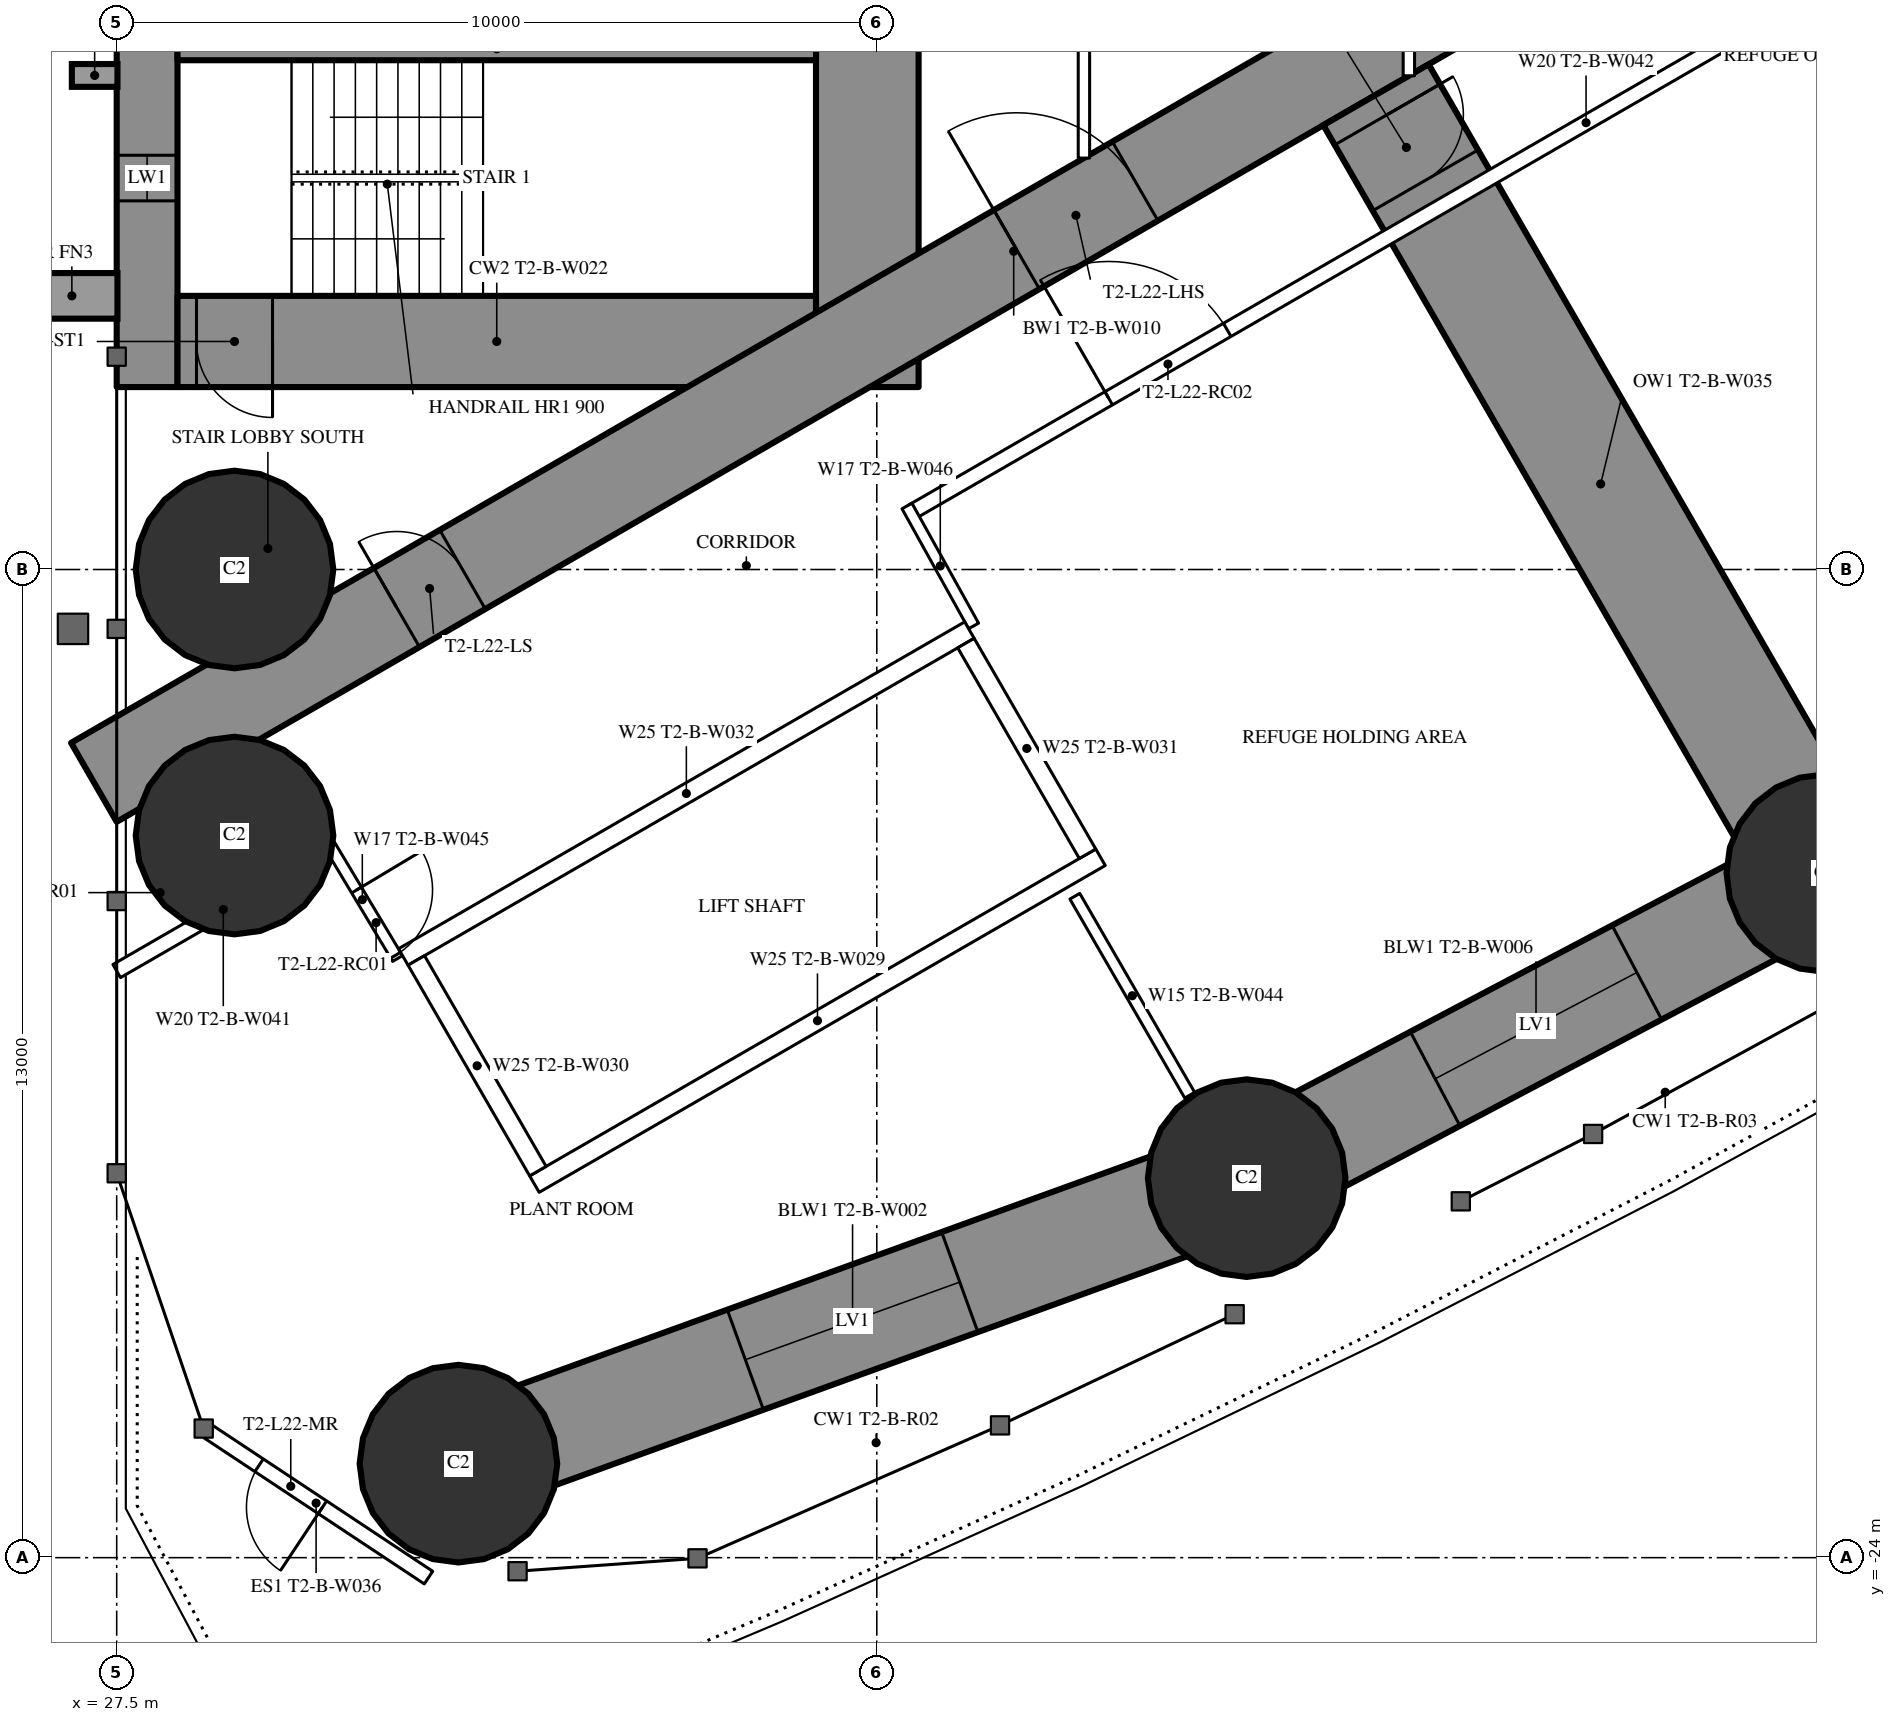
"""IFC4 building model, lengths in metres.
Left out: names, types, materials, properties, quantities, classifications, styles, units other than length and angle.
Written with IfcOpenShell. Run it as: python <this file> out.ifc"""

import sys

from ifc_helpers import new_model, si_unit, direction, frame, frame_2d, origin, origin_2d, place, context, subcontext, project, spatial, rectangle, hollow_circle, extrude, element, fill, save


model = new_model("IFC4")
c1 = context("Model", 3, precision=1e-05, world=origin(), true_north=direction((0.0, 1.0)))
c2 = subcontext(c1, "Body", "Model", "MODEL_VIEW")
j1 = project(units=[si_unit("LENGTHUNIT", "METRE"), si_unit("PLANEANGLEUNIT", "RADIAN")], contexts=[c1])
p1 = place(None, origin())
s1 = spatial("IfcSite", under=j1, at=p1, CompositionType="ELEMENT")
p2 = place(p1, origin())
s2 = spatial("IfcBuilding", under=s1, at=p2, CompositionType="ELEMENT")
p3 = place(p2, frame((0.0, 0.0, 87.0)))
s3 = spatial("IfcBuildingStorey", under=s2, at=p3, CompositionType="ELEMENT", Elevation=87.0)
for number, where, z_axis, x_axis in (
    (1, (31.996, -22.763, 0.0), (0.0, 0.0, 1.0), (1.0, 0.0, 0.0)),
    (2, (29.05, -11.0, 0.0), (0.0, 0.0, 1.0), (1.0, 0.0, 0.0)),
    (3, (29.05, -14.5, 0.0), (0.0, 0.0, 1.0), (1.0, 0.0, 0.0)),
    (4, (42.366, -19.007, 0.0), (0.0, 0.0, 1.0), (1.0, 0.0, 0.0)),
    (5, (49.979, -14.994, 0.0), (0.0, 0.0, 1.0), (1.0, 0.0, 0.0)),
):
    element("IfcColumn", number, at=place(p3, frame(where, z_axis=z_axis, x_axis=x_axis)), inside=s3, PredefinedType="COLUMN", context=c2, shape_type="SweptSolid", body=[
        extrude(hollow_circle(Radius=1.3, WallThickness=0.1, at=origin_2d()), origin(), (0.0, 0.0, 1.0), 3.6),
    ])
p4 = place(p3, frame((27.9, -8.6, 0.0), z_axis=(0.0, 0.0, 1.0), x_axis=(0.0, 1.0, 0.0)))
e6 = element("IfcWall", 6, at=p4, inside=s3, PredefinedType="SHEAR", context=c2, shape_type="SweptSolid", body=[
    extrude(rectangle(XDim=17.2, YDim=0.8, at=frame_2d((8.6, 0.0))), origin(), (0.0, 0.0, 1.0), 3.6),
])
p5 = place(p4, frame((2.45, 0.0, 0.6)))
e7 = element("IfcOpeningElement", 7, at=p5, cuts=e6, PredefinedType="OPENING", context=c2, shape_type="SweptSolid", body=[
    extrude(rectangle(XDim=0.6, YDim=2.1, at=frame_2d((0.3, 1.05))), frame((0.0, 0.41, 0.0), z_axis=(0.0, -1.0, 0.0), x_axis=(1.0, 0.0, 0.0)), (0.0, 0.0, 1.0), 0.82),
])
p6 = place(p4, frame((14.15, 0.0, 0.6)))
e8 = element("IfcOpeningElement", 8, at=p6, cuts=e6, PredefinedType="OPENING", context=c2, shape_type="SweptSolid", body=[
    extrude(rectangle(XDim=0.6, YDim=2.1, at=frame_2d((0.3, 1.05))), frame((0.0, 0.41, 0.0), z_axis=(0.0, -1.0, 0.0), x_axis=(1.0, 0.0, 0.0)), (0.0, 0.0, 1.0), 0.82),
])
p7 = place(p3, frame((37.375, -8.6, 0.0), z_axis=(0.0, 0.0, 1.0), x_axis=(0.0, 1.0, 0.0)))
e9 = element("IfcWall", 9, at=p7, inside=s3, PredefinedType="SHEAR", context=c2, shape_type="SweptSolid", body=[
    extrude(rectangle(XDim=17.2, YDim=1.35, at=frame_2d((8.6, 0.0))), origin(), (0.0, 0.0, 1.0), 3.6),
])
p8 = place(p7, frame((7.7, 0.0, 0.0)))
e10 = element("IfcOpeningElement", 10, at=p8, cuts=e9, PredefinedType="OPENING", context=c2, shape_type="SweptSolid", body=[
    extrude(rectangle(XDim=1.8, YDim=2.2, at=frame_2d((0.9, 1.1))), frame((0.0, 0.685, 0.0), z_axis=(0.0, -1.0, 0.0), x_axis=(1.0, 0.0, 0.0)), (0.0, 0.0, 1.0), 1.37),
])
p9 = place(p3, frame((28.3, -8.0, 0.0), z_axis=(0.0, 0.0, 1.0), x_axis=(1.0, 0.0, 0.0)))
e11 = element("IfcWall", 11, at=p9, inside=s3, PredefinedType="SHEAR", context=c2, shape_type="SweptSolid", body=[
    extrude(rectangle(XDim=8.4, YDim=1.2, at=frame_2d((4.2, 0.0))), origin(), (0.0, 0.0, 1.0), 3.6),
])
p10 = place(p9, frame((0.25, 0.0, 0.0)))
e12 = element("IfcOpeningElement", 12, at=p10, cuts=e11, PredefinedType="OPENING", context=c2, shape_type="SweptSolid", body=[
    extrude(rectangle(XDim=1.0, YDim=2.2, at=frame_2d((0.5, 1.1))), frame((0.0, 0.61, 0.0), z_axis=(0.0, -1.0, 0.0), x_axis=(1.0, 0.0, 0.0)), (0.0, 0.0, 1.0), 1.22),
])
p11 = place(p3, frame((28.3, -4.15, 0.0), z_axis=(0.0, 0.0, 1.0), x_axis=(1.0, 0.0, 0.0)))
e13 = element("IfcWall", 13, at=p11, inside=s3, PredefinedType="SHEAR", context=c2, shape_type="SweptSolid", body=[
    extrude(rectangle(XDim=8.4, YDim=0.3, at=frame_2d((4.2, 0.0))), origin(), (0.0, 0.0, 1.0), 3.6),
])
p12 = place(p3, frame((27.2, -13.8, 0.0), z_axis=(0.0, 0.0, 1.0), x_axis=(0.866027159892, 0.499996958321, 0.0)))
e14 = element("IfcWall", 14, at=p12, inside=s3, PredefinedType="SHEAR", context=c2, shape_type="SweptSolid", body=[
    extrude(rectangle(XDim=27.947, YDim=1.2, at=frame_2d((13.973, 0.0))), origin(), (0.0, 0.0, 1.0), 3.6),
])
p13 = place(p12, frame((4.6, 0.0, 0.0)))
e15 = element("IfcOpeningElement", 15, at=p13, cuts=e14, PredefinedType="OPENING", context=c2, shape_type="SweptSolid", body=[
    extrude(rectangle(XDim=1.0, YDim=2.2, at=frame_2d((0.5, 1.1))), frame((0.0, 0.61, 0.0), z_axis=(0.0, -1.0, 0.0), x_axis=(1.0, 0.0, 0.0)), (0.0, 0.0, 1.0), 1.22),
])
p14 = place(p12, frame((14.018, 0.0, 0.0)))
e16 = element("IfcOpeningElement", 16, at=p14, cuts=e14, PredefinedType="OPENING", context=c2, shape_type="SweptSolid", body=[
    extrude(rectangle(XDim=1.8, YDim=2.2, at=frame_2d((0.9, 1.1))), frame((0.0, 0.61, 0.0), z_axis=(0.0, -1.0, 0.0), x_axis=(1.0, 0.0, 0.0)), (0.0, 0.0, 1.0), 1.22),
])
p15 = place(p3, frame((44.067, -4.754, 0.0), z_axis=(0.0, 0.0, 1.0), x_axis=(0.499987574995, -0.866032577246, 0.0)))
e17 = element("IfcWall", 17, at=p15, inside=s3, PredefinedType="SHEAR", context=c2, shape_type="SweptSolid", body=[
    extrude(rectangle(XDim=11.824, YDim=1.6, at=frame_2d((5.912, 0.0))), origin(), (0.0, 0.0, 1.0), 3.6),
])
p16 = place(p15, frame((0.3, 0.0, 0.0)))
e18 = element("IfcOpeningElement", 18, at=p16, cuts=e17, PredefinedType="OPENING", context=c2, shape_type="SweptSolid", body=[
    extrude(rectangle(XDim=1.0, YDim=2.2, at=frame_2d((0.5, 1.1))), frame((0.0, 0.81, 0.0), z_axis=(0.0, -1.0, 0.0), x_axis=(1.0, 0.0, 0.0)), (0.0, 0.0, 1.0), 1.62),
])
p17 = place(p3, frame((31.996, -22.763, 0.0), z_axis=(0.0, 0.0, 1.0), x_axis=(0.940225039526, 0.340553777029, 0.0)))
e19 = element("IfcWall", 19, at=p17, inside=s3, PredefinedType="SHEAR", context=c2, shape_type="SweptSolid", body=[
    extrude(rectangle(XDim=11.029, YDim=1.4, at=frame_2d((5.515, 0.0))), origin(), (0.0, 0.0, 1.0), 3.6),
])
p18 = place(p17, frame((4.015, 0.0, 0.6)))
e20 = element("IfcOpeningElement", 20, at=p18, cuts=e19, PredefinedType="OPENING", context=c2, shape_type="SweptSolid", body=[
    extrude(rectangle(XDim=3.0, YDim=1.2, at=frame_2d((1.5, 0.6))), frame((0.0, 0.71, 0.0), z_axis=(0.0, -1.0, 0.0), x_axis=(1.0, 0.0, 0.0)), (0.0, 0.0, 1.0), 1.42),
])
p19 = place(p3, frame((42.366, -19.007, 0.0), z_axis=(0.0, 0.0, 1.0), x_axis=(0.884632510133, 0.466288882578, 0.0)))
e21 = element("IfcWall", 21, at=p19, inside=s3, PredefinedType="SHEAR", context=c2, shape_type="SweptSolid", body=[
    extrude(rectangle(XDim=8.606, YDim=1.4, at=frame_2d((4.303, 0.0))), origin(), (0.0, 0.0, 1.0), 3.6),
])
p20 = place(p19, frame((2.803, 0.0, 0.6)))
e22 = element("IfcOpeningElement", 22, at=p20, cuts=e21, PredefinedType="OPENING", context=c2, shape_type="SweptSolid", body=[
    extrude(rectangle(XDim=3.0, YDim=1.2, at=frame_2d((1.5, 0.6))), frame((0.0, 0.71, 0.0), z_axis=(0.0, -1.0, 0.0), x_axis=(1.0, 0.0, 0.0)), (0.0, 0.0, 1.0), 1.42),
])
p21 = place(p3, frame((49.979, -14.994, 0.0), z_axis=(0.0, 0.0, 1.0), x_axis=(0.849312372751, 0.527890607505, 0.0)))
e23 = element("IfcWall", 23, at=p21, inside=s3, PredefinedType="SHEAR", context=c2, shape_type="SweptSolid", body=[
    extrude(rectangle(XDim=12.906, YDim=1.4, at=frame_2d((6.453, 0.0))), origin(), (0.0, 0.0, 1.0), 3.6),
])
p22 = place(p21, frame((4.953, 0.0, 0.6)))
e24 = element("IfcOpeningElement", 24, at=p22, cuts=e23, PredefinedType="OPENING", context=c2, shape_type="SweptSolid", body=[
    extrude(rectangle(XDim=3.0, YDim=1.2, at=frame_2d((1.5, 0.6))), frame((0.0, 0.71, 0.0), z_axis=(0.0, -1.0, 0.0), x_axis=(1.0, 0.0, 0.0)), (0.0, 0.0, 1.0), 1.42),
])
p23 = place(p3, frame((31.602, -24.262, 0.0), z_axis=(0.0, 0.0, 1.0), x_axis=(-0.833476513596, 0.552554885314, 0.0)))
e25 = element("IfcWall", 25, at=p23, inside=s3, PredefinedType="STANDARD", context=c2, shape_type="SweptSolid", body=[
    extrude(rectangle(XDim=3.548, YDim=0.2, at=frame_2d((1.774, 0.0))), origin(), (0.0, 0.0, 1.0), 3.35),
])
p24 = place(p23, frame((1.674, 0.0, 0.0)))
e26 = element("IfcOpeningElement", 26, at=p24, cuts=e25, PredefinedType="OPENING", context=c2, shape_type="SweptSolid", body=[
    extrude(rectangle(XDim=1.0, YDim=2.2, at=frame_2d((0.5, 1.1))), frame((0.0, 0.11, 0.0), z_axis=(0.0, -1.0, 0.0), x_axis=(1.0, 0.0, 0.0)), (0.0, 0.0, 1.0), 0.22),
])
p25 = place(p3, frame((40.105, -15.299, 0.0), z_axis=(0.0, 0.0, 1.0), x_axis=(0.499978822259, -0.866037630414, 0.0)))
e27 = element("IfcWall", 27, at=p25, inside=s3, PredefinedType="PARTITIONING", context=c2, shape_type="SweptSolid", body=[
    extrude(rectangle(XDim=3.023, YDim=0.15, at=frame_2d((1.511, 0.0))), origin(), (0.0, 0.0, 1.0), 3.35),
])
p26 = place(p3, frame((27.5, -16.282, 0.0), z_axis=(0.0, 0.0, 1.0), x_axis=(0.866039938485, 0.499974824316, 0.0)))
e28 = element("IfcWall", 28, at=p26, inside=s3, PredefinedType="PARTITIONING", context=c2, shape_type="SweptSolid", body=[
    extrude(rectangle(XDim=3.238, YDim=0.2, at=frame_2d((1.619, 0.0))), origin(), (0.0, 0.0, 1.0), 3.35),
])
p27 = place(p3, frame((37.96, -10.243, 0.0), z_axis=(0.0, 0.0, 1.0), x_axis=(0.866026429433, 0.499998223521, 0.0)))
e29 = element("IfcWall", 29, at=p27, inside=s3, PredefinedType="PARTITIONING", context=c2, shape_type="SweptSolid", body=[
    extrude(rectangle(XDim=20.487, YDim=0.2, at=frame_2d((10.243, 0.0))), origin(), (0.0, 0.0, 1.0), 3.35),
])
p28 = place(p27, frame((13.034, 0.0, 0.0)))
e30 = element("IfcOpeningElement", 30, at=p28, cuts=e29, PredefinedType="OPENING", context=c2, shape_type="SweptSolid", body=[
    extrude(rectangle(XDim=1.8, YDim=2.2, at=frame_2d((0.9, 1.1))), frame((0.0, 0.11, 0.0), z_axis=(0.0, -1.0, 0.0), x_axis=(1.0, 0.0, 0.0)), (0.0, 0.0, 1.0), 0.22),
])
p29 = place(p27, frame((2.992, 0.0, 0.0)))
e31 = element("IfcOpeningElement", 31, at=p29, cuts=e29, PredefinedType="OPENING", context=c2, shape_type="SweptSolid", body=[
    extrude(rectangle(XDim=1.8, YDim=2.2, at=frame_2d((0.9, 1.1))), frame((0.0, 0.11, 0.0), z_axis=(0.0, -1.0, 0.0), x_axis=(1.0, 0.0, 0.0)), (0.0, 0.0, 1.0), 0.22),
])
p30 = place(p3, frame((30.267, -14.569, 0.0), z_axis=(0.0, 0.0, 1.0), x_axis=(0.514336634837, -0.857588377991, 0.0)))
e32 = element("IfcWall", 32, at=p30, inside=s3, PredefinedType="PARTITIONING", context=c2, shape_type="SweptSolid", body=[
    extrude(rectangle(XDim=1.805, YDim=0.15, at=frame_2d((0.903, 0.0))), origin(), (0.0, 0.0, 1.0), 3.35),
])
p31 = place(p30, frame((0.755, 0.0, 0.0)))
e33 = element("IfcOpeningElement", 33, at=p31, cuts=e32, PredefinedType="OPENING", context=c2, shape_type="SweptSolid", body=[
    extrude(rectangle(XDim=1.0, YDim=2.03, at=frame_2d((0.5, 1.015))), frame((0.0, 0.085, 0.0), z_axis=(0.0, -1.0, 0.0), x_axis=(1.0, 0.0, 0.0)), (0.0, 0.0, 1.0), 0.17),
])
p32 = place(p3, frame((38.773, -11.742, 0.0), z_axis=(0.0, 0.0, 1.0), x_axis=(-0.485528096672, 0.8742210632, 0.0)))
e34 = element("IfcWall", 34, at=p32, inside=s3, PredefinedType="PARTITIONING", context=c2, shape_type="SweptSolid", body=[
    extrude(rectangle(XDim=1.805, YDim=0.15, at=frame_2d((0.903, 0.0))), origin(), (0.0, 0.0, 1.0), 3.35),
])
p33 = place(p3, frame((40.225, -5.587, 0.0), z_axis=(0.0, 0.0, 1.0), x_axis=(0.0, 1.0, 0.0)))
e35 = element("IfcWall", 35, at=p33, inside=s3, PredefinedType="PARTITIONING", context=c2, shape_type="SweptSolid", body=[
    extrude(rectangle(XDim=11.174, YDim=0.15, at=frame_2d((5.587, 0.0))), origin(), (0.0, 0.0, 1.0), 3.35),
])
p34 = place(p33, frame((4.687, 0.0, 0.0)))
e36 = element("IfcOpeningElement", 36, at=p34, cuts=e35, PredefinedType="OPENING", context=c2, shape_type="SweptSolid", body=[
    extrude(rectangle(XDim=1.8, YDim=2.2, at=frame_2d((0.9, 1.1))), frame((0.0, 0.085, 0.0), z_axis=(0.0, -1.0, 0.0), x_axis=(1.0, 0.0, 0.0)), (0.0, 0.0, 1.0), 0.17),
])
p35 = place(p3, frame((44.5, -4.505, 0.0), z_axis=(0.0, 0.0, 1.0), x_axis=(0.0, 1.0, 0.0)))
e37 = element("IfcWall", 37, at=p35, inside=s3, PredefinedType="PARTITIONING", context=c2, shape_type="SweptSolid", body=[
    extrude(rectangle(XDim=7.986, YDim=0.15, at=frame_2d((3.993, 0.0))), origin(), (0.0, 0.0, 1.0), 3.35),
])
p36 = place(p35, frame((4.005, 0.0, 0.0)))
e38 = element("IfcOpeningElement", 38, at=p36, cuts=e37, PredefinedType="OPENING", context=c2, shape_type="SweptSolid", body=[
    extrude(rectangle(XDim=1.0, YDim=2.2, at=frame_2d((0.5, 1.1))), frame((0.0, 0.085, 0.0), z_axis=(0.0, -1.0, 0.0), x_axis=(1.0, 0.0, 0.0)), (0.0, 0.0, 1.0), 0.17),
])
for number, where, z_axis, x_axis in (
    (39, (31.271, -16.097, 0.0), (0.0, 0.0, 1.0), (0.866, 0.5, 0.0)),
    (40, (32.996, -19.086, 0.0), (0.0, 0.0, 1.0), (0.866, 0.5, 0.0)),
):
    element("IfcWall", number, at=place(p3, frame(where, z_axis=z_axis, x_axis=x_axis)), inside=s3, PredefinedType="PARTITIONING", context=c2, shape_type="SweptSolid", body=[
        extrude(rectangle(XDim=8.6, YDim=0.25, at=frame_2d((4.3, 0.0))), origin(), (0.0, 0.0, 1.0), 3.35),
    ])
for number, where, z_axis, x_axis in (
    (41, (31.441, -16.143, 0.0), (0.0, 0.0, 1.0), (0.5, -0.866, 0.0)),
    (42, (38.673, -11.968, 0.0), (0.0, 0.0, 1.0), (0.5, -0.866, 0.0)),
):
    element("IfcWall", number, at=place(p3, frame(where, z_axis=z_axis, x_axis=x_axis)), inside=s3, PredefinedType="PARTITIONING", context=c2, shape_type="SweptSolid", body=[
        extrude(rectangle(XDim=3.201, YDim=0.25, at=frame_2d((1.6, 0.0))), origin(), (0.0, 0.0, 1.0), 3.35),
    ])
p37 = place(p18, origin())
e43 = element("IfcWindow", 43, at=p37, inside=s3, PartitioningType="SINGLE_PANEL", PredefinedType="WINDOW", context=c2, shape_type="SweptSolid", body=[
    extrude(rectangle(XDim=3.0, YDim=1.2, at=frame_2d((1.5, 0.6))), frame((0.0, 0.03, 0.0), z_axis=(0.0, -1.0, 0.0), x_axis=(1.0, 0.0, 0.0)), (0.0, 0.0, 1.0), 0.06),
])
fill(e20, e43)
p38 = place(p20, origin())
e44 = element("IfcWindow", 44, at=p38, inside=s3, PartitioningType="SINGLE_PANEL", PredefinedType="WINDOW", context=c2, shape_type="SweptSolid", body=[
    extrude(rectangle(XDim=3.0, YDim=1.2, at=frame_2d((1.5, 0.6))), frame((0.0, 0.03, 0.0), z_axis=(0.0, -1.0, 0.0), x_axis=(1.0, 0.0, 0.0)), (0.0, 0.0, 1.0), 0.06),
])
fill(e22, e44)
p39 = place(p24, origin())
e45 = element("IfcDoor", 45, at=p39, inside=s3, OperationType="SINGLE_SWING_LEFT", PredefinedType="DOOR", context=c2, shape_type="SweptSolid", body=[
    extrude(rectangle(XDim=1.0, YDim=2.2, at=frame_2d((0.5, 1.1))), frame((0.0, 0.025, 0.0), z_axis=(0.0, -1.0, 0.0), x_axis=(1.0, 0.0, 0.0)), (0.0, 0.0, 1.0), 0.05),
])
fill(e26, e45)
p40 = place(p16, origin())
e46 = element("IfcDoor", 46, at=p40, inside=s3, OperationType="SINGLE_SWING_LEFT", PredefinedType="DOOR", context=c2, shape_type="SweptSolid", body=[
    extrude(rectangle(XDim=1.0, YDim=2.2, at=frame_2d((0.5, 1.1))), frame((0.0, 0.025, 0.0), z_axis=(0.0, -1.0, 0.0), x_axis=(1.0, 0.0, 0.0)), (0.0, 0.0, 1.0), 0.05),
])
fill(e18, e46)
p41 = place(p31, origin())
e47 = element("IfcDoor", 47, at=p41, inside=s3, OperationType="SINGLE_SWING_LEFT", PredefinedType="DOOR", context=c2, shape_type="SweptSolid", body=[
    extrude(rectangle(XDim=1.0, YDim=2.03, at=frame_2d((0.5, 1.015))), frame((0.0, 0.025, 0.0), z_axis=(0.0, -1.0, 0.0), x_axis=(1.0, 0.0, 0.0)), (0.0, 0.0, 1.0), 0.05),
])
fill(e33, e47)
p42 = place(p29, origin())
e48 = element("IfcDoor", 48, at=p42, inside=s3, OperationType="DOUBLE_DOOR_SINGLE_SWING", PredefinedType="DOOR", context=c2, shape_type="SweptSolid", body=[
    extrude(rectangle(XDim=1.8, YDim=2.2, at=frame_2d((0.9, 1.1))), frame((0.0, 0.025, 0.0), z_axis=(0.0, -1.0, 0.0), x_axis=(1.0, 0.0, 0.0)), (0.0, 0.0, 1.0), 0.05),
])
fill(e31, e48)
p43 = place(p13, origin())
e49 = element("IfcDoor", 49, at=p43, inside=s3, OperationType="SINGLE_SWING_LEFT", PredefinedType="DOOR", context=c2, shape_type="SweptSolid", body=[
    extrude(rectangle(XDim=1.0, YDim=2.2, at=frame_2d((0.5, 1.1))), frame((0.0, 0.025, 0.0), z_axis=(0.0, -1.0, 0.0), x_axis=(1.0, 0.0, 0.0)), (0.0, 0.0, 1.0), 0.05),
])
fill(e15, e49)
p44 = place(p14, origin())
e50 = element("IfcDoor", 50, at=p44, inside=s3, OperationType="DOUBLE_DOOR_SINGLE_SWING", PredefinedType="DOOR", context=c2, shape_type="SweptSolid", body=[
    extrude(rectangle(XDim=1.8, YDim=2.2, at=frame_2d((0.9, 1.1))), frame((0.0, 0.025, 0.0), z_axis=(0.0, -1.0, 0.0), x_axis=(1.0, 0.0, 0.0)), (0.0, 0.0, 1.0), 0.05),
])
fill(e16, e50)
p45 = place(p10, origin())
e51 = element("IfcDoor", 51, at=p45, inside=s3, OperationType="SINGLE_SWING_RIGHT", PredefinedType="DOOR", context=c2, shape_type="SweptSolid", body=[
    extrude(rectangle(XDim=1.0, YDim=2.2, at=frame_2d((0.5, 1.1))), frame((0.0, 0.025, 0.0), z_axis=(0.0, -1.0, 0.0), x_axis=(1.0, 0.0, 0.0)), (0.0, 0.0, 1.0), 0.05),
])
fill(e12, e51)
p46 = place(p5, origin())
e52 = element("IfcWindow", 52, at=p46, inside=s3, PartitioningType="SINGLE_PANEL", PredefinedType="WINDOW", context=c2, shape_type="SweptSolid", body=[
    extrude(rectangle(XDim=0.6, YDim=2.1, at=frame_2d((0.3, 1.05))), frame((0.0, 0.03, 0.0), z_axis=(0.0, -1.0, 0.0), x_axis=(1.0, 0.0, 0.0)), (0.0, 0.0, 1.0), 0.06),
])
fill(e7, e52)
save(model, sys.argv[1])
